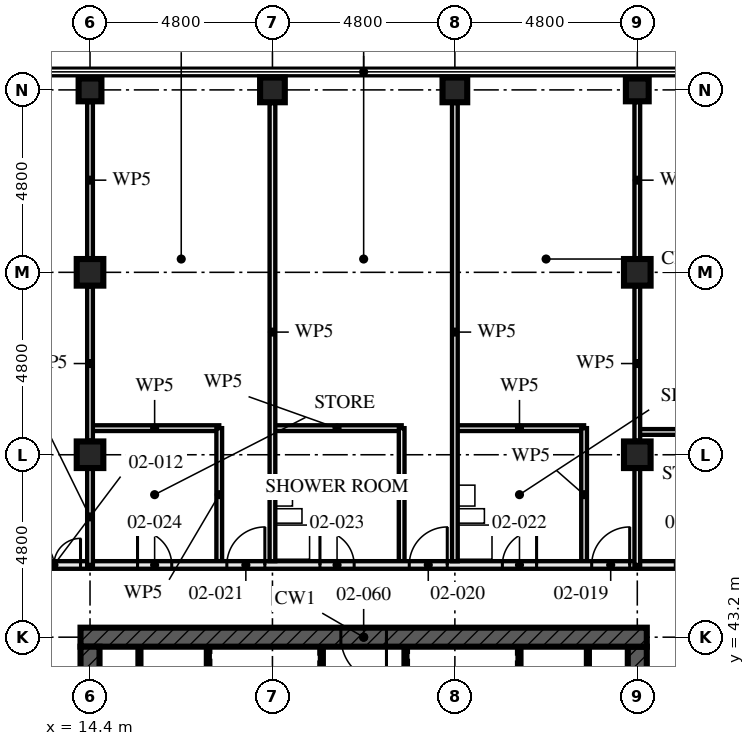
"""IFC4 building model, lengths in metres.
Left out: names, types, materials, properties, quantities, classifications, styles, units other than length and angle.
Written with IfcOpenShell. Run it as: python <this file> out.ifc"""

import sys

from ifc_helpers import new_model, si_unit, direction, frame, frame_2d, origin, origin_2d, place, context, subcontext, project, spatial, rectangle, hollow_rectangle, extrude, element, fill, save


model = new_model("IFC4")
c1 = context("Model", 3, precision=1e-05, world=origin(), true_north=direction((0.0, 1.0)))
c2 = subcontext(c1, "Body", "Model", "MODEL_VIEW")
j1 = project(units=[si_unit("LENGTHUNIT", "METRE"), si_unit("PLANEANGLEUNIT", "RADIAN")], contexts=[c1])
p1 = place(None, origin())
s1 = spatial("IfcSite", under=j1, at=p1, CompositionType="ELEMENT")
p2 = place(p1, origin())
s2 = spatial("IfcBuilding", under=s1, at=p2, CompositionType="ELEMENT")
p3 = place(p2, frame((0.0, 0.0, 9.0)))
s3 = spatial("IfcBuildingStorey", under=s2, at=p3, CompositionType="ELEMENT", Elevation=9.0)
for number, where, z_axis, x_axis in (
    (1, (14.4, 48.0, 0.0), (0.0, 0.0, 1.0), (1.0, 0.0, 0.0)),
    (2, (14.4, 52.8, 0.0), (0.0, 0.0, 1.0), (1.0, 0.0, 0.0)),
):
    element("IfcColumn", number, at=place(p3, frame(where, z_axis=z_axis, x_axis=x_axis)), inside=s3, PredefinedType="COLUMN", context=c2, shape_type="SweptSolid", body=[
        extrude(hollow_rectangle(XDim=0.7, YDim=0.7, WallThickness=0.06, at=origin_2d()), origin(), (0.0, 0.0, 1.0), 4.5),
    ])
p4 = place(p3, frame((14.4, 57.6, 0.0), z_axis=(0.0, 0.0, 1.0), x_axis=(0.0, 1.0, 0.0)))
e3 = element("IfcColumn", 3, at=p4, inside=s3, PredefinedType="COLUMN", context=c2, shape_type="SweptSolid", body=[
    extrude(hollow_rectangle(XDim=0.6, YDim=0.6, WallThickness=0.08, at=origin_2d()), origin(), (0.0, 0.0, 1.0), 4.5),
])
for number, where, z_axis, x_axis in (
    (4, (19.2, 57.6, 0.0), (0.0, 0.0, 1.0), (0.0, 1.0, 0.0)),
    (5, (24.0, 57.6, 0.0), (0.0, 0.0, 1.0), (0.0, 1.0, 0.0)),
):
    element("IfcColumn", number, at=place(p3, frame(where, z_axis=z_axis, x_axis=x_axis)), inside=s3, PredefinedType="COLUMN", context=c2, shape_type="SweptSolid", body=[
        extrude(hollow_rectangle(XDim=0.65, YDim=0.65, WallThickness=0.08, at=origin_2d()), origin(), (0.0, 0.0, 1.0), 4.5),
    ])
for number, where, z_axis, x_axis in (
    (6, (28.8, 48.0, 0.0), (0.0, 0.0, 1.0), (1.0, 0.0, 0.0)),
    (7, (28.8, 52.8, 0.0), (0.0, 0.0, 1.0), (1.0, 0.0, 0.0)),
):
    element("IfcColumn", number, at=place(p3, frame(where, z_axis=z_axis, x_axis=x_axis)), inside=s3, PredefinedType="COLUMN", context=c2, shape_type="SweptSolid", body=[
        extrude(hollow_rectangle(XDim=0.7, YDim=0.7, WallThickness=0.06, at=origin_2d()), origin(), (0.0, 0.0, 1.0), 4.5),
    ])
p5 = place(p3, frame((28.8, 57.6, 0.0), z_axis=(0.0, 0.0, 1.0), x_axis=(0.0, 1.0, 0.0)))
e8 = element("IfcColumn", 8, at=p5, inside=s3, PredefinedType="COLUMN", context=c2, shape_type="SweptSolid", body=[
    extrude(hollow_rectangle(XDim=0.6, YDim=0.6, WallThickness=0.08, at=origin_2d()), origin(), (0.0, 0.0, 1.0), 4.5),
])
p6 = place(p3, frame((29.05, 43.2, -0.17), z_axis=(0.0, 0.0, 1.0), x_axis=(-1.0, 0.0, 0.0)))
e9 = element("IfcWall", 9, at=p6, inside=s3, PredefinedType="SHEAR", context=c2, shape_type="SweptSolid", body=[
    extrude(rectangle(XDim=14.9, YDim=0.5, at=frame_2d((7.45, 0.0))), origin(), (0.0, 0.0, 1.0), 4.5),
])
p7 = place(p6, frame((6.85, 0.0, 0.17)))
e10 = element("IfcOpeningElement", 10, at=p7, cuts=e9, PredefinedType="OPENING", context=c2, shape_type="SweptSolid", body=[
    extrude(rectangle(XDim=1.2, YDim=2.1, at=frame_2d((0.6, 1.05))), frame((0.0, 0.26, 0.0), z_axis=(0.0, -1.0, 0.0), x_axis=(1.0, 0.0, 0.0)), (0.0, 0.0, 1.0), 0.521),
])
p8 = place(p3, frame((14.4, 42.95, -0.17), z_axis=(0.0, 0.0, 1.0), x_axis=(0.0, -1.0, 0.0)))
e11 = element("IfcWall", 11, at=p8, inside=s3, PredefinedType="SHEAR", context=c2, shape_type="SweptSolid", body=[
    extrude(rectangle(XDim=13.9, YDim=0.5, at=frame_2d((6.95, 0.0))), origin(), (0.0, 0.0, 1.0), 4.5),
])
p9 = place(p8, frame((6.35, 0.0, 0.17)))
e12 = element("IfcOpeningElement", 12, at=p9, cuts=e11, PredefinedType="OPENING", context=c2, shape_type="SweptSolid", body=[
    extrude(rectangle(XDim=1.2, YDim=2.1, at=frame_2d((0.6, 1.05))), frame((0.0, 0.26, 0.0), z_axis=(0.0, -1.0, 0.0), x_axis=(1.0, 0.0, 0.0)), (0.0, 0.0, 1.0), 0.521),
])
p10 = place(p3, frame((28.8, 29.05, -0.17), z_axis=(0.0, 0.0, 1.0), x_axis=(0.0, 1.0, 0.0)))
e13 = element("IfcWall", 13, at=p10, inside=s3, PredefinedType="SHEAR", context=c2, shape_type="SweptSolid", body=[
    extrude(rectangle(XDim=13.9, YDim=0.5, at=frame_2d((6.95, 0.0))), origin(), (0.0, 0.0, 1.0), 4.5),
])
p11 = place(p10, frame((6.35, 0.0, 0.17)))
e14 = element("IfcOpeningElement", 14, at=p11, cuts=e13, PredefinedType="OPENING", context=c2, shape_type="SweptSolid", body=[
    extrude(rectangle(XDim=1.2, YDim=2.1, at=frame_2d((0.6, 1.05))), frame((0.0, 0.26, 0.0), z_axis=(0.0, -1.0, 0.0), x_axis=(1.0, 0.0, 0.0)), (0.0, 0.0, 1.0), 0.521),
])
p12 = place(p3, frame((14.4, 45.1, 0.0), z_axis=(0.0, 0.0, 1.0), x_axis=(-1.0, 0.0, 0.0)))
e15 = element("IfcWall", 15, at=p12, inside=s3, PredefinedType="PARTITIONING", context=c2, shape_type="SweptSolid", body=[
    extrude(rectangle(XDim=14.855, YDim=0.2, at=frame_2d((7.427, 0.0))), origin(), (0.0, 0.0, 1.0), 3.32),
])
p13 = place(p12, frame((0.25, 0.0, 0.0)))
e16 = element("IfcOpeningElement", 16, at=p13, cuts=e15, PredefinedType="OPENING", context=c2, shape_type="SweptSolid", body=[
    extrude(rectangle(XDim=1.4, YDim=2.4, at=frame_2d((0.7, 1.2))), frame((0.0, 0.111, 0.0), z_axis=(0.0, -1.0, 0.0), x_axis=(1.0, 0.0, 0.0)), (0.0, 0.0, 1.0), 0.221),
])
p14 = place(p12, frame((5.05, 0.0, 0.0)))
e17 = element("IfcOpeningElement", 17, at=p14, cuts=e15, PredefinedType="OPENING", context=c2, shape_type="SweptSolid", body=[
    extrude(rectangle(XDim=1.4, YDim=2.4, at=frame_2d((0.7, 1.2))), frame((0.0, 0.111, 0.0), z_axis=(0.0, -1.0, 0.0), x_axis=(1.0, 0.0, 0.0)), (0.0, 0.0, 1.0), 0.221),
])
p15 = place(p12, frame((9.8, 0.0, 0.0)))
e18 = element("IfcOpeningElement", 18, at=p15, cuts=e15, PredefinedType="OPENING", context=c2, shape_type="SweptSolid", body=[
    extrude(rectangle(XDim=1.0, YDim=2.4, at=frame_2d((0.5, 1.2))), frame((0.0, 0.111, 0.0), z_axis=(0.0, -1.0, 0.0), x_axis=(1.0, 0.0, 0.0)), (0.0, 0.0, 1.0), 0.221),
])
p16 = place(p12, frame((2.9, 0.0, 0.0)))
e19 = element("IfcOpeningElement", 19, at=p16, cuts=e15, PredefinedType="OPENING", context=c2, shape_type="SweptSolid", body=[
    extrude(rectangle(XDim=0.9, YDim=2.1, at=frame_2d((0.45, 1.05))), frame((0.0, 0.111, 0.0), z_axis=(0.0, -1.0, 0.0), x_axis=(1.0, 0.0, 0.0)), (0.0, 0.0, 1.0), 0.221),
])
p17 = place(p12, frame((7.65, 0.0, 0.0)))
e20 = element("IfcOpeningElement", 20, at=p17, cuts=e15, PredefinedType="OPENING", context=c2, shape_type="SweptSolid", body=[
    extrude(rectangle(XDim=1.0, YDim=2.1, at=frame_2d((0.5, 1.05))), frame((0.0, 0.111, 0.0), z_axis=(0.0, -1.0, 0.0), x_axis=(1.0, 0.0, 0.0)), (0.0, 0.0, 1.0), 0.221),
])
p18 = place(p12, frame((12.25, 0.0, 0.0)))
e21 = element("IfcOpeningElement", 21, at=p18, cuts=e15, PredefinedType="OPENING", context=c2, shape_type="SweptSolid", body=[
    extrude(rectangle(XDim=0.9, YDim=2.1, at=frame_2d((0.45, 1.05))), frame((0.0, 0.111, 0.0), z_axis=(0.0, -1.0, 0.0), x_axis=(1.0, 0.0, 0.0)), (0.0, 0.0, 1.0), 0.221),
])
p19 = place(p3, frame((27.4, 48.7, 0.0), z_axis=(0.0, 0.0, 1.0), x_axis=(0.0, -1.0, 0.0)))
e22 = element("IfcWall", 22, at=p19, inside=s3, PredefinedType="PARTITIONING", context=c2, shape_type="SweptSolid", body=[
    extrude(rectangle(XDim=3.5, YDim=0.15, at=frame_2d((1.75, 0.0))), origin(), (0.0, 0.0, 1.0), 3.55),
])
p20 = place(p3, frame((27.4, 48.7, 0.0), z_axis=(0.0, 0.0, 1.0), x_axis=(-1.0, 0.0, 0.0)))
e23 = element("IfcWall", 23, at=p20, inside=s3, PredefinedType="PARTITIONING", context=c2, shape_type="SweptSolid", body=[
    extrude(rectangle(XDim=3.4, YDim=0.15, at=frame_2d((1.7, 0.0))), origin(), (0.0, 0.0, 1.0), 4.33),
])
p21 = place(p3, frame((22.6, 48.7, 0.0), z_axis=(0.0, 0.0, 1.0), x_axis=(0.0, -1.0, 0.0)))
e24 = element("IfcWall", 24, at=p21, inside=s3, PredefinedType="PARTITIONING", context=c2, shape_type="SweptSolid", body=[
    extrude(rectangle(XDim=3.5, YDim=0.15, at=frame_2d((1.75, 0.0))), origin(), (0.0, 0.0, 1.0), 3.55),
])
p22 = place(p3, frame((22.6, 48.7, 0.0), z_axis=(0.0, 0.0, 1.0), x_axis=(-1.0, 0.0, 0.0)))
e25 = element("IfcWall", 25, at=p22, inside=s3, PredefinedType="PARTITIONING", context=c2, shape_type="SweptSolid", body=[
    extrude(rectangle(XDim=3.4, YDim=0.15, at=frame_2d((1.7, 0.0))), origin(), (0.0, 0.0, 1.0), 4.33),
])
p23 = place(p3, frame((17.8, 48.7, 0.0), z_axis=(0.0, 0.0, 1.0), x_axis=(0.0, -1.0, 0.0)))
e26 = element("IfcWall", 26, at=p23, inside=s3, PredefinedType="PARTITIONING", context=c2, shape_type="SweptSolid", body=[
    extrude(rectangle(XDim=3.5, YDim=0.15, at=frame_2d((1.75, 0.0))), origin(), (0.0, 0.0, 1.0), 3.55),
])
p24 = place(p3, frame((17.8, 48.7, 0.0), z_axis=(0.0, 0.0, 1.0), x_axis=(-1.0, 0.0, 0.0)))
e27 = element("IfcWall", 27, at=p24, inside=s3, PredefinedType="PARTITIONING", context=c2, shape_type="SweptSolid", body=[
    extrude(rectangle(XDim=3.4, YDim=0.15, at=frame_2d((1.7, 0.0))), origin(), (0.0, 0.0, 1.0), 4.33),
])
for number, where, z_axis, x_axis in (
    (28, (24.0, 57.255, 0.0), (0.0, 0.0, 1.0), (0.0, -1.0, 0.0)),
    (29, (19.2, 57.255, 0.0), (0.0, 0.0, 1.0), (0.0, -1.0, 0.0)),
):
    element("IfcWall", number, at=place(p3, frame(where, z_axis=z_axis, x_axis=x_axis)), inside=s3, PredefinedType="PARTITIONING", context=c2, shape_type="SweptSolid", body=[
        extrude(rectangle(XDim=12.055, YDim=0.15, at=frame_2d((6.027, 0.0))), origin(), (0.0, 0.0, 1.0), 3.55),
    ])
p25 = place(p3, frame((28.8, 45.1, 0.0), z_axis=(0.0, 0.0, 1.0), x_axis=(-1.0, 0.0, 0.0)))
e30 = element("IfcWall", 30, at=p25, inside=s3, PredefinedType="PARTITIONING", context=c2, shape_type="SweptSolid", body=[
    extrude(rectangle(XDim=14.4, YDim=0.2, at=frame_2d((7.2, 0.0))), origin(), (0.0, 0.0, 1.0), 4.33),
])
p26 = place(p25, frame((0.2, 0.0, 0.0)))
e31 = element("IfcOpeningElement", 31, at=p26, cuts=e30, PredefinedType="OPENING", context=c2, shape_type="SweptSolid", body=[
    extrude(rectangle(XDim=1.0, YDim=2.4, at=frame_2d((0.5, 1.2))), frame((0.0, 0.111, 0.0), z_axis=(0.0, -1.0, 0.0), x_axis=(1.0, 0.0, 0.0)), (0.0, 0.0, 1.0), 0.221),
])
p27 = place(p25, frame((5.0, 0.0, 0.0)))
e32 = element("IfcOpeningElement", 32, at=p27, cuts=e30, PredefinedType="OPENING", context=c2, shape_type="SweptSolid", body=[
    extrude(rectangle(XDim=1.0, YDim=2.4, at=frame_2d((0.5, 1.2))), frame((0.0, 0.111, 0.0), z_axis=(0.0, -1.0, 0.0), x_axis=(1.0, 0.0, 0.0)), (0.0, 0.0, 1.0), 0.221),
])
p28 = place(p25, frame((9.8, 0.0, 0.0)))
e33 = element("IfcOpeningElement", 33, at=p28, cuts=e30, PredefinedType="OPENING", context=c2, shape_type="SweptSolid", body=[
    extrude(rectangle(XDim=1.0, YDim=2.4, at=frame_2d((0.5, 1.2))), frame((0.0, 0.111, 0.0), z_axis=(0.0, -1.0, 0.0), x_axis=(1.0, 0.0, 0.0)), (0.0, 0.0, 1.0), 0.221),
])
p29 = place(p25, frame((2.65, 0.0, 0.0)))
e34 = element("IfcOpeningElement", 34, at=p29, cuts=e30, PredefinedType="OPENING", context=c2, shape_type="SweptSolid", body=[
    extrude(rectangle(XDim=0.9, YDim=2.1, at=frame_2d((0.45, 1.05))), frame((0.0, 0.111, 0.0), z_axis=(0.0, -1.0, 0.0), x_axis=(1.0, 0.0, 0.0)), (0.0, 0.0, 1.0), 0.221),
])
p30 = place(p25, frame((7.45, 0.0, 0.0)))
e35 = element("IfcOpeningElement", 35, at=p30, cuts=e30, PredefinedType="OPENING", context=c2, shape_type="SweptSolid", body=[
    extrude(rectangle(XDim=0.9, YDim=2.1, at=frame_2d((0.45, 1.05))), frame((0.0, 0.111, 0.0), z_axis=(0.0, -1.0, 0.0), x_axis=(1.0, 0.0, 0.0)), (0.0, 0.0, 1.0), 0.221),
])
p31 = place(p25, frame((12.25, 0.0, 0.0)))
e36 = element("IfcOpeningElement", 36, at=p31, cuts=e30, PredefinedType="OPENING", context=c2, shape_type="SweptSolid", body=[
    extrude(rectangle(XDim=0.9, YDim=2.1, at=frame_2d((0.45, 1.05))), frame((0.0, 0.111, 0.0), z_axis=(0.0, -1.0, 0.0), x_axis=(1.0, 0.0, 0.0)), (0.0, 0.0, 1.0), 0.221),
])
p32 = place(p3, frame((31.7, 48.6, 0.0), z_axis=(0.0, 0.0, 1.0), x_axis=(-1.0, 0.0, 0.0)))
e37 = element("IfcWall", 37, at=p32, inside=s3, PredefinedType="PARTITIONING", context=c2, shape_type="SweptSolid", body=[
    extrude(rectangle(XDim=2.9, YDim=0.15, at=frame_2d((1.45, 0.0))), origin(), (0.0, 0.0, 1.0), 4.33),
])
p33 = place(p3, frame((43.655, 45.1, 0.0), z_axis=(0.0, 0.0, 1.0), x_axis=(-1.0, 0.0, 0.0)))
e38 = element("IfcWall", 38, at=p33, inside=s3, PredefinedType="PARTITIONING", context=c2, shape_type="SweptSolid", body=[
    extrude(rectangle(XDim=14.855, YDim=0.2, at=frame_2d((7.427, 0.0))), origin(), (0.0, 0.0, 1.0), 3.32),
])
p34 = place(p33, frame((0.705, 0.0, 0.0)))
e39 = element("IfcOpeningElement", 39, at=p34, cuts=e38, PredefinedType="OPENING", context=c2, shape_type="SweptSolid", body=[
    extrude(rectangle(XDim=1.4, YDim=2.4, at=frame_2d((0.7, 1.2))), frame((0.0, 0.111, 0.0), z_axis=(0.0, -1.0, 0.0), x_axis=(1.0, 0.0, 0.0)), (0.0, 0.0, 1.0), 0.221),
])
p35 = place(p33, frame((10.305, 0.0, 0.0)))
e40 = element("IfcOpeningElement", 40, at=p35, cuts=e38, PredefinedType="OPENING", context=c2, shape_type="SweptSolid", body=[
    extrude(rectangle(XDim=1.4, YDim=2.4, at=frame_2d((0.7, 1.2))), frame((0.0, 0.111, 0.0), z_axis=(0.0, -1.0, 0.0), x_axis=(1.0, 0.0, 0.0)), (0.0, 0.0, 1.0), 0.221),
])
p36 = place(p33, frame((3.355, 0.0, 0.0)))
e41 = element("IfcOpeningElement", 41, at=p36, cuts=e38, PredefinedType="OPENING", context=c2, shape_type="SweptSolid", body=[
    extrude(rectangle(XDim=0.9, YDim=2.1, at=frame_2d((0.45, 1.05))), frame((0.0, 0.111, 0.0), z_axis=(0.0, -1.0, 0.0), x_axis=(1.0, 0.0, 0.0)), (0.0, 0.0, 1.0), 0.221),
])
p37 = place(p33, frame((7.155, 0.0, 0.0)))
e42 = element("IfcOpeningElement", 42, at=p37, cuts=e38, PredefinedType="OPENING", context=c2, shape_type="SweptSolid", body=[
    extrude(rectangle(XDim=1.0, YDim=2.1, at=frame_2d((0.5, 1.05))), frame((0.0, 0.111, 0.0), z_axis=(0.0, -1.0, 0.0), x_axis=(1.0, 0.0, 0.0)), (0.0, 0.0, 1.0), 0.221),
])
p38 = place(p33, frame((12.955, 0.0, 0.0)))
e43 = element("IfcOpeningElement", 43, at=p38, cuts=e38, PredefinedType="OPENING", context=c2, shape_type="SweptSolid", body=[
    extrude(rectangle(XDim=0.9, YDim=2.1, at=frame_2d((0.45, 1.05))), frame((0.0, 0.111, 0.0), z_axis=(0.0, -1.0, 0.0), x_axis=(1.0, 0.0, 0.0)), (0.0, 0.0, 1.0), 0.221),
])
for number, where, z_axis, x_axis in (
    (44, (15.7, 37.15, 0.0), (0.0, 0.0, 1.0), (0.0, 1.0, 0.0)),
    (45, (27.5, 37.15, 0.0), (0.0, 0.0, 1.0), (0.0, 1.0, 0.0)),
):
    element("IfcWall", number, at=place(p3, frame(where, z_axis=z_axis, x_axis=x_axis)), inside=s3, PredefinedType="SOLIDWALL", context=c2, shape_type="SweptSolid", body=[
        extrude(rectangle(XDim=5.8, YDim=0.1, at=frame_2d((2.9, 0.0))), origin(), (0.0, 0.0, 1.0), 4.33),
    ])
p39 = place(p3, frame((20.5, 37.15, 0.0), z_axis=(0.0, 0.0, 1.0), x_axis=(0.0, 1.0, 0.0)))
e46 = element("IfcWall", 46, at=p39, inside=s3, PredefinedType="SOLIDWALL", context=c2, shape_type="SweptSolid", body=[
    extrude(rectangle(XDim=5.8, YDim=0.1, at=frame_2d((2.9, 0.0))), origin(), (0.0, 0.0, 1.0), 4.33),
])
p40 = place(p39, frame((0.925, 0.0, 0.0)))
e47 = element("IfcOpeningElement", 47, at=p40, cuts=e46, PredefinedType="OPENING", context=c2, shape_type="SweptSolid", body=[
    extrude(rectangle(XDim=1.0, YDim=2.1, at=frame_2d((0.5, 1.05))), frame((0.0, 0.061, 0.0), z_axis=(0.0, -1.0, 0.0), x_axis=(1.0, 0.0, 0.0)), (0.0, 0.0, 1.0), 0.121),
])
p41 = place(p39, frame((3.9, 0.0, 0.0)))
e48 = element("IfcOpeningElement", 48, at=p41, cuts=e46, PredefinedType="OPENING", context=c2, shape_type="SweptSolid", body=[
    extrude(rectangle(XDim=1.0, YDim=2.1, at=frame_2d((0.5, 1.05))), frame((0.0, 0.061, 0.0), z_axis=(0.0, -1.0, 0.0), x_axis=(1.0, 0.0, 0.0)), (0.0, 0.0, 1.0), 0.121),
])
for number, where, z_axis, x_axis in (
    (49, (22.7, 37.15, 0.0), (0.0, 0.0, 1.0), (0.0, 1.0, 0.0)),
    (50, (17.5, 37.15, 0.0), (0.0, 0.0, 1.0), (0.0, 1.0, 0.0)),
    (51, (25.7, 37.15, 0.0), (0.0, 0.0, 1.0), (0.0, 1.0, 0.0)),
):
    element("IfcWall", number, at=place(p3, frame(where, z_axis=z_axis, x_axis=x_axis)), inside=s3, PredefinedType="SOLIDWALL", context=c2, shape_type="SweptSolid", body=[
        extrude(rectangle(XDim=5.8, YDim=0.1, at=frame_2d((2.9, 0.0))), origin(), (0.0, 0.0, 1.0), 4.33),
    ])
p42 = place(p3, frame((14.4, 45.1, 0.0), z_axis=(0.0, 0.0, 1.0), x_axis=(0.0, 1.0, 0.0)))
e52 = element("IfcWall", 52, at=p42, inside=s3, PredefinedType="PARTITIONING", context=c2, shape_type="SweptSolid", body=[
    extrude(rectangle(XDim=2.53, YDim=0.15, at=frame_2d((1.265, 0.0))), origin(), (0.0, 0.0, 1.0), 3.32),
])
p43 = place(p3, frame((14.4, 48.37, 0.0), z_axis=(0.0, 0.0, 1.0), x_axis=(0.0, 1.0, 0.0)))
e53 = element("IfcWall", 53, at=p43, inside=s3, PredefinedType="PARTITIONING", context=c2, shape_type="SweptSolid", body=[
    extrude(rectangle(XDim=4.06, YDim=0.15, at=frame_2d((2.03, 0.0))), origin(), (0.0, 0.0, 1.0), 3.32),
])
p44 = place(p3, frame((14.4, 53.17, 0.0), z_axis=(0.0, 0.0, 1.0), x_axis=(0.0, 1.0, 0.0)))
e54 = element("IfcWall", 54, at=p44, inside=s3, PredefinedType="PARTITIONING", context=c2, shape_type="SweptSolid", body=[
    extrude(rectangle(XDim=4.11, YDim=0.15, at=frame_2d((2.055, 0.0))), origin(), (0.0, 0.0, 1.0), 3.32),
])
p45 = place(p3, frame((28.8, 45.1, 0.0), z_axis=(0.0, 0.0, 1.0), x_axis=(0.0, 1.0, 0.0)))
e55 = element("IfcWall", 55, at=p45, inside=s3, PredefinedType="PARTITIONING", context=c2, shape_type="SweptSolid", body=[
    extrude(rectangle(XDim=2.53, YDim=0.15, at=frame_2d((1.265, 0.0))), origin(), (0.0, 0.0, 1.0), 3.32),
])
p46 = place(p3, frame((28.8, 48.37, 0.0), z_axis=(0.0, 0.0, 1.0), x_axis=(0.0, 1.0, 0.0)))
e56 = element("IfcWall", 56, at=p46, inside=s3, PredefinedType="PARTITIONING", context=c2, shape_type="SweptSolid", body=[
    extrude(rectangle(XDim=4.06, YDim=0.15, at=frame_2d((2.03, 0.0))), origin(), (0.0, 0.0, 1.0), 3.32),
])
p47 = place(p3, frame((28.8, 53.17, 0.0), z_axis=(0.0, 0.0, 1.0), x_axis=(0.0, 1.0, 0.0)))
e57 = element("IfcWall", 57, at=p47, inside=s3, PredefinedType="PARTITIONING", context=c2, shape_type="SweptSolid", body=[
    extrude(rectangle(XDim=4.11, YDim=0.15, at=frame_2d((2.055, 0.0))), origin(), (0.0, 0.0, 1.0), 3.32),
])
p48 = place(p13, frame((1.4, 0.0, 0.0), z_axis=(0.0, 0.0, 1.0), x_axis=(-1.0, 0.0, 0.0)))
e58 = element("IfcDoor", 58, at=p48, inside=s3, OperationType="DOUBLE_DOOR_SINGLE_SWING", PredefinedType="DOOR", context=c2, shape_type="SweptSolid", body=[
    extrude(rectangle(XDim=1.4, YDim=2.4, at=frame_2d((0.7, 1.2))), frame((0.0, 0.027, 0.0), z_axis=(0.0, -1.0, 0.0), x_axis=(1.0, 0.0, 0.0)), (0.0, 0.0, 1.0), 0.054),
])
fill(e16, e58)
p49 = place(p26, frame((1.0, 0.0, 0.0), z_axis=(0.0, 0.0, 1.0), x_axis=(-1.0, 0.0, 0.0)))
e59 = element("IfcDoor", 59, at=p49, inside=s3, OperationType="SINGLE_SWING_LEFT", PredefinedType="DOOR", context=c2, shape_type="SweptSolid", body=[
    extrude(rectangle(XDim=1.0, YDim=2.4, at=frame_2d((0.5, 1.2))), frame((0.0, 0.027, 0.0), z_axis=(0.0, -1.0, 0.0), x_axis=(1.0, 0.0, 0.0)), (0.0, 0.0, 1.0), 0.054),
])
fill(e31, e59)
p50 = place(p27, frame((1.0, 0.0, 0.0), z_axis=(0.0, 0.0, 1.0), x_axis=(-1.0, 0.0, 0.0)))
e60 = element("IfcDoor", 60, at=p50, inside=s3, OperationType="SINGLE_SWING_LEFT", PredefinedType="DOOR", context=c2, shape_type="SweptSolid", body=[
    extrude(rectangle(XDim=1.0, YDim=2.4, at=frame_2d((0.5, 1.2))), frame((0.0, 0.027, 0.0), z_axis=(0.0, -1.0, 0.0), x_axis=(1.0, 0.0, 0.0)), (0.0, 0.0, 1.0), 0.054),
])
fill(e32, e60)
p51 = place(p28, frame((1.0, 0.0, 0.0), z_axis=(0.0, 0.0, 1.0), x_axis=(-1.0, 0.0, 0.0)))
e61 = element("IfcDoor", 61, at=p51, inside=s3, OperationType="SINGLE_SWING_LEFT", PredefinedType="DOOR", context=c2, shape_type="SweptSolid", body=[
    extrude(rectangle(XDim=1.0, YDim=2.4, at=frame_2d((0.5, 1.2))), frame((0.0, 0.027, 0.0), z_axis=(0.0, -1.0, 0.0), x_axis=(1.0, 0.0, 0.0)), (0.0, 0.0, 1.0), 0.054),
])
fill(e33, e61)
p52 = place(p29, frame((0.9, 0.0, 0.0), z_axis=(0.0, 0.0, 1.0), x_axis=(-1.0, 0.0, 0.0)))
e62 = element("IfcDoor", 62, at=p52, inside=s3, OperationType="SINGLE_SWING_LEFT", PredefinedType="DOOR", context=c2, shape_type="SweptSolid", body=[
    extrude(rectangle(XDim=0.9, YDim=2.1, at=frame_2d((0.45, 1.05))), frame((0.0, 0.027, 0.0), z_axis=(0.0, -1.0, 0.0), x_axis=(1.0, 0.0, 0.0)), (0.0, 0.0, 1.0), 0.054),
])
fill(e34, e62)
p53 = place(p30, frame((0.9, 0.0, 0.0), z_axis=(0.0, 0.0, 1.0), x_axis=(-1.0, 0.0, 0.0)))
e63 = element("IfcDoor", 63, at=p53, inside=s3, OperationType="SINGLE_SWING_RIGHT", PredefinedType="DOOR", context=c2, shape_type="SweptSolid", body=[
    extrude(rectangle(XDim=0.9, YDim=2.1, at=frame_2d((0.45, 1.05))), frame((0.0, 0.027, 0.0), z_axis=(0.0, -1.0, 0.0), x_axis=(1.0, 0.0, 0.0)), (0.0, 0.0, 1.0), 0.054),
])
fill(e35, e63)
p54 = place(p31, frame((0.9, 0.0, 0.0), z_axis=(0.0, 0.0, 1.0), x_axis=(-1.0, 0.0, 0.0)))
e64 = element("IfcDoor", 64, at=p54, inside=s3, OperationType="SINGLE_SWING_RIGHT", PredefinedType="DOOR", context=c2, shape_type="SweptSolid", body=[
    extrude(rectangle(XDim=0.9, YDim=2.1, at=frame_2d((0.45, 1.05))), frame((0.0, 0.027, 0.0), z_axis=(0.0, -1.0, 0.0), x_axis=(1.0, 0.0, 0.0)), (0.0, 0.0, 1.0), 0.054),
])
fill(e36, e64)
p55 = place(p7, origin())
e65 = element("IfcDoor", 65, at=p55, inside=s3, OperationType="SINGLE_SWING_LEFT", PredefinedType="DOOR", context=c2, shape_type="SweptSolid", body=[
    extrude(rectangle(XDim=1.2, YDim=2.1, at=frame_2d((0.6, 1.05))), frame((0.0, 0.027, 0.0), z_axis=(0.0, -1.0, 0.0), x_axis=(1.0, 0.0, 0.0)), (0.0, 0.0, 1.0), 0.054),
])
fill(e10, e65)
save(model, sys.argv[1])
